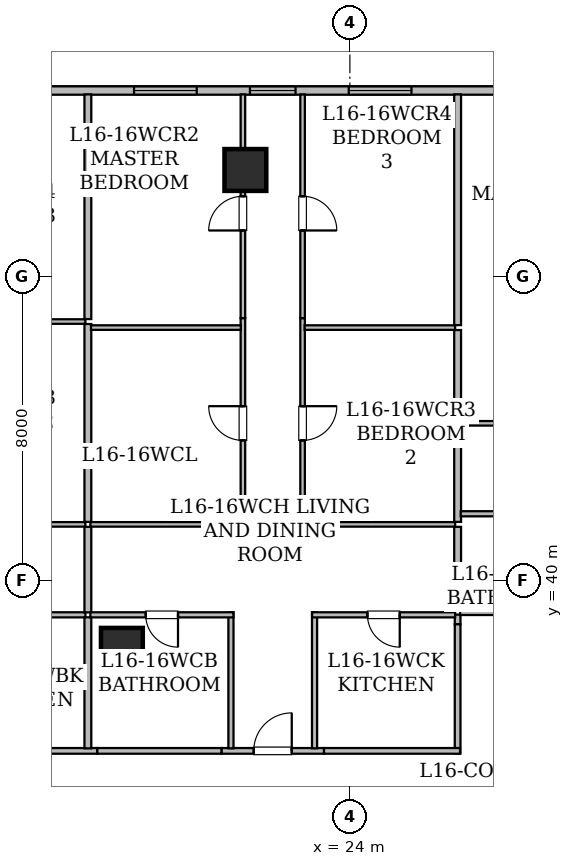
"""IFC4 building model, lengths in metres.
Left out: names, types, materials, properties, quantities, classifications, styles, units other than length and angle.
Written with IfcOpenShell. Run it as: python <this file> out.ifc"""

import sys

from ifc_helpers import new_model, si_unit, direction, frame, frame_2d, origin, origin_2d, place, context, subcontext, project, spatial, rectangle, hollow_rectangle, extrude, element, fill, save


model = new_model("IFC4")
c1 = context("Model", 3, precision=1e-05, world=origin(), true_north=direction((0.0, 1.0)))
c2 = subcontext(c1, "Body", "Model", "MODEL_VIEW")
j1 = project(units=[si_unit("LENGTHUNIT", "METRE"), si_unit("PLANEANGLEUNIT", "RADIAN")], contexts=[c1])
p1 = place(None, origin())
s1 = spatial("IfcSite", under=j1, at=p1, CompositionType="ELEMENT")
p2 = place(p1, origin())
s2 = spatial("IfcBuilding", under=s1, at=p2, CompositionType="ELEMENT")
p3 = place(p2, frame((0.0, 0.0, 66.15)))
s3 = spatial("IfcBuildingStorey", under=s2, at=p3, CompositionType="ELEMENT", Elevation=66.15)
for number, where, z_axis, x_axis in (
    (1, (21.25, 50.8, 0.0), (0.0, 0.0, 1.0), (1.0, 0.0, 0.0)),
    (2, (18.0, 38.2, 0.0), (0.0, 0.0, 1.0), (1.0, 0.0, 0.0)),
):
    element("IfcColumn", number, at=place(p3, frame(where, z_axis=z_axis, x_axis=x_axis)), inside=s3, PredefinedType="COLUMN", context=c2, shape_type="SweptSolid", body=[
        extrude(hollow_rectangle(XDim=1.1, YDim=1.1, WallThickness=0.055, at=origin_2d()), origin(), (0.0, 0.0, 1.0), 3.65),
    ])
p4 = place(p3, frame((8.315, 52.89, 0.0), z_axis=(0.0, 0.0, 1.0), x_axis=(1.0, 0.0, 0.0)))
e3 = element("IfcWall", 3, at=p4, inside=s3, PredefinedType="STANDARD", context=c2, shape_type="SweptSolid", body=[
    extrude(rectangle(XDim=37.439, YDim=0.22, at=frame_2d((18.719, 0.0))), origin(), (0.0, 0.0, 1.0), 3.43),
])
p5 = place(p4, frame((5.093, 0.0, 0.85)))
e4 = element("IfcOpeningElement", 4, at=p5, cuts=e3, PredefinedType="OPENING", context=c2, shape_type="SweptSolid", body=[
    extrude(rectangle(XDim=1.65, YDim=1.55, at=frame_2d((0.825, 0.775))), frame((0.0, 0.12, 0.0), z_axis=(0.0, -1.0, 0.0), x_axis=(1.0, 0.0, 0.0)), (0.0, 0.0, 1.0), 0.24),
])
p6 = place(p4, frame((13.055, 0.0, 0.8)))
e5 = element("IfcOpeningElement", 5, at=p6, cuts=e3, PredefinedType="OPENING", context=c2, shape_type="SweptSolid", body=[
    extrude(rectangle(XDim=1.2, YDim=1.5, at=frame_2d((0.6, 0.75))), frame((0.0, 0.12, 0.0), z_axis=(0.0, -1.0, 0.0), x_axis=(1.0, 0.0, 0.0)), (0.0, 0.0, 1.0), 0.24),
])
p7 = place(p4, frame((10.005, 0.0, 0.85)))
e6 = element("IfcOpeningElement", 6, at=p7, cuts=e3, PredefinedType="OPENING", context=c2, shape_type="SweptSolid", body=[
    extrude(rectangle(XDim=1.65, YDim=1.55, at=frame_2d((0.825, 0.775))), frame((0.0, 0.12, 0.0), z_axis=(0.0, -1.0, 0.0), x_axis=(1.0, 0.0, 0.0)), (0.0, 0.0, 1.0), 0.24),
])
p8 = place(p4, frame((15.655, 0.0, 0.85)))
e7 = element("IfcOpeningElement", 7, at=p8, cuts=e3, PredefinedType="OPENING", context=c2, shape_type="SweptSolid", body=[
    extrude(rectangle(XDim=1.65, YDim=1.55, at=frame_2d((0.825, 0.775))), frame((0.0, 0.12, 0.0), z_axis=(0.0, -1.0, 0.0), x_axis=(1.0, 0.0, 0.0)), (0.0, 0.0, 1.0), 0.24),
])
p9 = place(p4, frame((25.185, 0.0, 0.8)))
e8 = element("IfcOpeningElement", 8, at=p9, cuts=e3, PredefinedType="OPENING", context=c2, shape_type="SweptSolid", body=[
    extrude(rectangle(XDim=1.2, YDim=1.5, at=frame_2d((0.6, 0.75))), frame((0.0, 0.12, 0.0), z_axis=(0.0, -1.0, 0.0), x_axis=(1.0, 0.0, 0.0)), (0.0, 0.0, 1.0), 0.24),
])
p10 = place(p4, frame((20.935, 0.0, 0.85)))
e9 = element("IfcOpeningElement", 9, at=p10, cuts=e3, PredefinedType="OPENING", context=c2, shape_type="SweptSolid", body=[
    extrude(rectangle(XDim=1.65, YDim=1.55, at=frame_2d((0.825, 0.775))), frame((0.0, 0.12, 0.0), z_axis=(0.0, -1.0, 0.0), x_axis=(1.0, 0.0, 0.0)), (0.0, 0.0, 1.0), 0.24),
])
p11 = place(p4, frame((28.985, 0.0, 0.85)))
e10 = element("IfcOpeningElement", 10, at=p11, cuts=e3, PredefinedType="OPENING", context=c2, shape_type="SweptSolid", body=[
    extrude(rectangle(XDim=1.65, YDim=1.55, at=frame_2d((0.825, 0.775))), frame((0.0, 0.12, 0.0), z_axis=(0.0, -1.0, 0.0), x_axis=(1.0, 0.0, 0.0)), (0.0, 0.0, 1.0), 0.24),
])
p12 = place(p4, frame((33.49, 0.0, 0.85)))
e11 = element("IfcOpeningElement", 11, at=p12, cuts=e3, PredefinedType="OPENING", context=c2, shape_type="SweptSolid", body=[
    extrude(rectangle(XDim=1.65, YDim=1.55, at=frame_2d((0.825, 0.775))), frame((0.0, 0.12, 0.0), z_axis=(0.0, -1.0, 0.0), x_axis=(1.0, 0.0, 0.0)), (0.0, 0.0, 1.0), 0.24),
])
p13 = place(p4, frame((35.942, 0.0, 0.85)))
e12 = element("IfcOpeningElement", 12, at=p13, cuts=e3, PredefinedType="OPENING", context=c2, shape_type="SweptSolid", body=[
    extrude(rectangle(XDim=1.35, YDim=1.5, at=frame_2d((0.675, 0.75))), frame((0.0, 0.12, 0.0), z_axis=(0.0, -1.0, 0.0), x_axis=(1.0, 0.0, 0.0)), (0.0, 0.0, 1.0), 0.24),
])
p14 = place(p3, frame((11.924, 35.515, 0.0), z_axis=(0.0, 0.0, 1.0), x_axis=(1.0, 0.0, 0.0)))
e13 = element("IfcWall", 13, at=p14, inside=s3, PredefinedType="STANDARD", context=c2, shape_type="SweptSolid", body=[
    extrude(rectangle(XDim=5.43, YDim=0.15, at=frame_2d((2.715, 0.0))), origin(), (0.0, 0.0, 1.0), 3.43),
])
p15 = place(p3, frame((26.835, 38.846, 0.0), z_axis=(0.0, 0.0, 1.0), x_axis=(0.0, 1.0, 0.0)))
e14 = element("IfcWall", 14, at=p15, inside=s3, PredefinedType="STANDARD", context=c2, shape_type="SweptSolid", body=[
    extrude(rectangle(XDim=0.254, YDim=0.15, at=frame_2d((0.127, 0.0))), origin(), (0.0, 0.0, 1.0), 3.43),
])
p16 = place(p3, frame((20.621, 35.515, 0.0), z_axis=(0.0, 0.0, 1.0), x_axis=(1.0, 0.0, 0.0)))
e15 = element("IfcWall", 15, at=p16, inside=s3, PredefinedType="STANDARD", context=c2, shape_type="SweptSolid", body=[
    extrude(rectangle(XDim=2.698, YDim=0.15, at=frame_2d((1.349, 0.0))), origin(), (0.0, 0.0, 1.0), 3.43),
])
p17 = place(p16, frame((0.849, 0.0, 0.0)))
e16 = element("IfcOpeningElement", 16, at=p17, cuts=e15, PredefinedType="OPENING", context=c2, shape_type="SweptSolid", body=[
    extrude(rectangle(XDim=1.0, YDim=2.15, at=frame_2d((0.5, 1.075))), frame((0.0, 0.085, 0.0), z_axis=(0.0, -1.0, 0.0), x_axis=(1.0, 0.0, 0.0)), (0.0, 0.0, 1.0), 0.17),
])
p18 = place(p3, frame((17.354, 35.515, 0.0), z_axis=(0.0, 0.0, 1.0), x_axis=(1.0, 0.0, 0.0)))
e17 = element("IfcWall", 17, at=p18, inside=s3, PredefinedType="STANDARD", context=c2, shape_type="SweptSolid", body=[
    extrude(rectangle(XDim=3.267, YDim=0.15, at=frame_2d((1.634, 0.0))), origin(), (0.0, 0.0, 1.0), 2.647),
])
p19 = place(p3, frame((26.835, 35.45, 0.0), z_axis=(0.0, 0.0, 1.0), x_axis=(0.0, 1.0, 0.0)))
e18 = element("IfcWall", 18, at=p19, inside=s3, PredefinedType="STANDARD", context=c2, shape_type="SweptSolid", body=[
    extrude(rectangle(XDim=3.396, YDim=0.15, at=frame_2d((1.698, 0.0))), origin(), (0.0, 0.0, 1.0), 2.647),
])
p20 = place(p3, frame((23.319, 35.515, 0.0), z_axis=(0.0, 0.0, 1.0), x_axis=(1.0, 0.0, 0.0)))
e19 = element("IfcWall", 19, at=p20, inside=s3, PredefinedType="STANDARD", context=c2, shape_type="SweptSolid", body=[
    extrude(rectangle(XDim=3.579, YDim=0.15, at=frame_2d((1.79, 0.0))), origin(), (0.0, 0.0, 1.0), 3.43),
])
p21 = place(p3, frame((26.9, 39.165, 0.0), z_axis=(0.0, 0.0, 1.0), x_axis=(1.0, 0.0, 0.0)))
e20 = element("IfcWall", 20, at=p21, inside=s3, PredefinedType="STANDARD", context=c2, shape_type="SweptSolid", body=[
    extrude(rectangle(XDim=4.701, YDim=0.15, at=frame_2d((2.351, 0.0))), origin(), (0.0, 0.0, 1.0), 2.647),
])
p22 = place(p3, frame((17.04, 39.095, 0.0), z_axis=(0.0, 0.0, 1.0), x_axis=(-1.0, 0.0, 0.0)))
e21 = element("IfcWall", 21, at=p22, inside=s3, PredefinedType="PARTITIONING", context=c2, shape_type="SweptSolid", body=[
    extrude(rectangle(XDim=5.43, YDim=0.135, at=frame_2d((2.715, 0.0))), origin(), (0.0, 0.0, 1.0), 2.647),
])
p23 = place(p22, frame((2.29, 0.0, 0.0)))
e22 = element("IfcOpeningElement", 22, at=p23, cuts=e21, PredefinedType="OPENING", context=c2, shape_type="SweptSolid", body=[
    extrude(rectangle(XDim=0.85, YDim=2.1, at=frame_2d((0.425, 1.05))), frame((0.0, 0.077, 0.0), z_axis=(0.0, -1.0, 0.0), x_axis=(1.0, 0.0, 0.0)), (0.0, 0.0, 1.0), 0.155),
])
p24 = place(p3, frame((11.295, 41.475, 0.0), z_axis=(0.0, 0.0, 1.0), x_axis=(1.0, 0.0, 0.0)))
e23 = element("IfcWall", 23, at=p24, inside=s3, PredefinedType="PARTITIONING", context=c2, shape_type="SweptSolid", body=[
    extrude(rectangle(XDim=5.745, YDim=0.12, at=frame_2d((2.873, 0.0))), origin(), (0.0, 0.0, 1.0), 2.647),
])
p25 = place(p24, frame((2.422, 0.0, 0.0)))
e24 = element("IfcOpeningElement", 24, at=p25, cuts=e23, PredefinedType="OPENING", context=c2, shape_type="SweptSolid", body=[
    extrude(rectangle(XDim=0.9, YDim=2.1, at=frame_2d((0.45, 1.05))), frame((0.0, 0.07, 0.0), z_axis=(0.0, -1.0, 0.0), x_axis=(1.0, 0.0, 0.0)), (0.0, 0.0, 1.0), 0.14),
])
p26 = place(p3, frame((17.105, 41.41, 0.0), z_axis=(0.0, 0.0, 1.0), x_axis=(0.0, -1.0, 0.0)))
e25 = element("IfcWall", 25, at=p26, inside=s3, PredefinedType="STANDARD", context=c2, shape_type="SweptSolid", body=[
    extrude(rectangle(XDim=2.25, YDim=0.18, at=frame_2d((1.125, 0.0))), origin(), (0.0, 0.0, 1.0), 2.647),
])
p27 = place(p3, frame((17.105, 39.03, 0.0), z_axis=(0.0, 0.0, 1.0), x_axis=(0.0, -1.0, 0.0)))
e26 = element("IfcWall", 26, at=p27, inside=s3, PredefinedType="STANDARD", context=c2, shape_type="SweptSolid", body=[
    extrude(rectangle(XDim=3.448, YDim=0.18, at=frame_2d((1.724, 0.0))), origin(), (0.0, 0.0, 1.0), 2.647),
])
p28 = place(p3, frame((11.414, 46.812, 0.0), z_axis=(0.0, 0.0, 1.0), x_axis=(1.0, 0.0, 0.0)))
e27 = element("IfcWall", 27, at=p28, inside=s3, PredefinedType="PARTITIONING", context=c2, shape_type="SweptSolid", body=[
    extrude(rectangle(XDim=5.626, YDim=0.12, at=frame_2d((2.813, 0.0))), origin(), (0.0, 0.0, 1.0), 2.647),
])
p29 = place(p3, frame((17.105, 46.747, 0.0), z_axis=(0.0, 0.0, 1.0), x_axis=(0.0, -1.0, 0.0)))
e28 = element("IfcWall", 28, at=p29, inside=s3, PredefinedType="STANDARD", context=c2, shape_type="SweptSolid", body=[
    extrude(rectangle(XDim=5.207, YDim=0.18, at=frame_2d((2.604, 0.0))), origin(), (0.0, 0.0, 1.0), 3.065),
])
p30 = place(p3, frame((17.105, 52.788, 0.0), z_axis=(0.0, 0.0, 1.0), x_axis=(0.0, -1.0, 0.0)))
e29 = element("IfcWall", 29, at=p30, inside=s3, PredefinedType="STANDARD", context=c2, shape_type="SweptSolid", body=[
    extrude(rectangle(XDim=5.911, YDim=0.18, at=frame_2d((2.956, 0.0))), origin(), (0.0, 0.0, 1.0), 2.803),
])
p31 = place(p3, frame((20.87, 35.582, 0.0), z_axis=(0.0, 0.0, 1.0), x_axis=(0.0, 1.0, 0.0)))
e30 = element("IfcWall", 30, at=p31, inside=s3, PredefinedType="PARTITIONING", context=c2, shape_type="SweptSolid", body=[
    extrude(rectangle(XDim=3.578, YDim=0.135, at=frame_2d((1.789, 0.0))), origin(), (0.0, 0.0, 1.0), 2.647),
])
p32 = place(p3, frame((20.935, 39.095, 0.0), z_axis=(0.0, 0.0, 1.0), x_axis=(-1.0, 0.0, 0.0)))
e31 = element("IfcWall", 31, at=p32, inside=s3, PredefinedType="PARTITIONING", context=c2, shape_type="SweptSolid", body=[
    extrude(rectangle(XDim=3.765, YDim=0.135, at=frame_2d((1.883, 0.0))), origin(), (0.0, 0.0, 1.0), 2.647),
])
p33 = place(p32, frame((1.458, 0.0, 0.0)))
e32 = element("IfcOpeningElement", 32, at=p33, cuts=e31, PredefinedType="OPENING", context=c2, shape_type="SweptSolid", body=[
    extrude(rectangle(XDim=0.85, YDim=2.1, at=frame_2d((0.425, 1.05))), frame((0.0, 0.077, 0.0), z_axis=(0.0, -1.0, 0.0), x_axis=(1.0, 0.0, 0.0)), (0.0, 0.0, 1.0), 0.155),
])
p34 = place(p3, frame((23.07, 39.16, 0.0), z_axis=(0.0, 0.0, 1.0), x_axis=(0.0, -1.0, 0.0)))
e33 = element("IfcWall", 33, at=p34, inside=s3, PredefinedType="PARTITIONING", context=c2, shape_type="SweptSolid", body=[
    extrude(rectangle(XDim=3.578, YDim=0.135, at=frame_2d((1.789, 0.0))), origin(), (0.0, 0.0, 1.0), 2.647),
])
p35 = place(p3, frame((26.77, 39.095, 0.0), z_axis=(0.0, 0.0, 1.0), x_axis=(-1.0, 0.0, 0.0)))
e34 = element("IfcWall", 34, at=p35, inside=s3, PredefinedType="PARTITIONING", context=c2, shape_type="SweptSolid", body=[
    extrude(rectangle(XDim=3.765, YDim=0.135, at=frame_2d((1.883, 0.0))), origin(), (0.0, 0.0, 1.0), 3.43),
])
p36 = place(p35, frame((1.458, 0.0, 0.0)))
e35 = element("IfcOpeningElement", 35, at=p36, cuts=e34, PredefinedType="OPENING", context=c2, shape_type="SweptSolid", body=[
    extrude(rectangle(XDim=0.85, YDim=2.1, at=frame_2d((0.425, 1.05))), frame((0.0, 0.077, 0.0), z_axis=(0.0, -1.0, 0.0), x_axis=(1.0, 0.0, 0.0)), (0.0, 0.0, 1.0), 0.155),
])
p37 = place(p3, frame((17.17, 41.475, 0.0), z_axis=(0.0, 0.0, 1.0), x_axis=(1.0, 0.0, 0.0)))
e36 = element("IfcWall", 36, at=p37, inside=s3, PredefinedType="PARTITIONING", context=c2, shape_type="SweptSolid", body=[
    extrude(rectangle(XDim=4.08, YDim=0.12, at=frame_2d((2.04, 0.0))), origin(), (0.0, 0.0, 1.0), 2.647),
])
p38 = place(p3, frame((21.185, 41.41, 0.0), z_axis=(0.0, 0.0, 1.0), x_axis=(0.0, 1.0, 0.0)))
e37 = element("IfcWall", 37, at=p38, inside=s3, PredefinedType="PARTITIONING", context=c2, shape_type="SweptSolid", body=[
    extrude(rectangle(XDim=5.492, YDim=0.12, at=frame_2d((2.746, 0.0))), origin(), (0.0, 0.0, 1.0), 3.065),
])
p39 = place(p38, frame((2.275, 0.0, 0.0)))
e38 = element("IfcOpeningElement", 38, at=p39, cuts=e37, PredefinedType="OPENING", context=c2, shape_type="SweptSolid", body=[
    extrude(rectangle(XDim=0.9, YDim=2.1, at=frame_2d((0.45, 1.05))), frame((0.0, 0.07, 0.0), z_axis=(0.0, -1.0, 0.0), x_axis=(1.0, 0.0, 0.0)), (0.0, 0.0, 1.0), 0.14),
])
p40 = place(p3, frame((21.185, 46.902, 0.0), z_axis=(0.0, 0.0, 1.0), x_axis=(0.0, 1.0, 0.0)))
e39 = element("IfcWall", 39, at=p40, inside=s3, PredefinedType="PARTITIONING", context=c2, shape_type="SweptSolid", body=[
    extrude(rectangle(XDim=5.886, YDim=0.12, at=frame_2d((2.943, 0.0))), origin(), (0.0, 0.0, 1.0), 2.647),
])
p41 = place(p40, frame((2.306, 0.0, 0.0)))
e40 = element("IfcOpeningElement", 40, at=p41, cuts=e39, PredefinedType="OPENING", context=c2, shape_type="SweptSolid", body=[
    extrude(rectangle(XDim=0.9, YDim=2.1, at=frame_2d((0.45, 1.05))), frame((0.0, 0.07, 0.0), z_axis=(0.0, -1.0, 0.0), x_axis=(1.0, 0.0, 0.0)), (0.0, 0.0, 1.0), 0.14),
])
p42 = place(p3, frame((22.755, 46.902, 0.0), z_axis=(0.0, 0.0, 1.0), x_axis=(0.0, -1.0, 0.0)))
e41 = element("IfcWall", 41, at=p42, inside=s3, PredefinedType="PARTITIONING", context=c2, shape_type="SweptSolid", body=[
    extrude(rectangle(XDim=5.492, YDim=0.12, at=frame_2d((2.746, 0.0))), origin(), (0.0, 0.0, 1.0), 3.065),
])
p43 = place(p42, frame((2.317, 0.0, 0.0)))
e42 = element("IfcOpeningElement", 42, at=p43, cuts=e41, PredefinedType="OPENING", context=c2, shape_type="SweptSolid", body=[
    extrude(rectangle(XDim=0.9, YDim=2.1, at=frame_2d((0.45, 1.05))), frame((0.0, 0.07, 0.0), z_axis=(0.0, -1.0, 0.0), x_axis=(1.0, 0.0, 0.0)), (0.0, 0.0, 1.0), 0.14),
])
p44 = place(p3, frame((22.69, 41.475, 0.0), z_axis=(0.0, 0.0, 1.0), x_axis=(1.0, 0.0, 0.0)))
e43 = element("IfcWall", 43, at=p44, inside=s3, PredefinedType="PARTITIONING", context=c2, shape_type="SweptSolid", body=[
    extrude(rectangle(XDim=4.08, YDim=0.12, at=frame_2d((2.04, 0.0))), origin(), (0.0, 0.0, 1.0), 3.43),
])
p45 = place(p3, frame((22.755, 52.788, 0.0), z_axis=(0.0, 0.0, 1.0), x_axis=(0.0, -1.0, 0.0)))
e44 = element("IfcWall", 44, at=p45, inside=s3, PredefinedType="PARTITIONING", context=c2, shape_type="SweptSolid", body=[
    extrude(rectangle(XDim=5.886, YDim=0.12, at=frame_2d((2.943, 0.0))), origin(), (0.0, 0.0, 1.0), 2.803),
])
p46 = place(p45, frame((2.68, 0.0, 0.0)))
e45 = element("IfcOpeningElement", 45, at=p46, cuts=e44, PredefinedType="OPENING", context=c2, shape_type="SweptSolid", body=[
    extrude(rectangle(XDim=0.9, YDim=2.1, at=frame_2d((0.45, 1.05))), frame((0.0, 0.07, 0.0), z_axis=(0.0, -1.0, 0.0), x_axis=(1.0, 0.0, 0.0)), (0.0, 0.0, 1.0), 0.14),
])
p47 = place(p3, frame((26.835, 41.41, 0.0), z_axis=(0.0, 0.0, 1.0), x_axis=(0.0, -1.0, 0.0)))
e46 = element("IfcWall", 46, at=p47, inside=s3, PredefinedType="STANDARD", context=c2, shape_type="SweptSolid", body=[
    extrude(rectangle(XDim=2.18, YDim=0.18, at=frame_2d((1.09, 0.0))), origin(), (0.0, 0.0, 1.0), 3.43),
])
p48 = place(p3, frame((17.187, 46.653, 0.0), z_axis=(0.0, 0.0, 1.0), x_axis=(1.0, 0.0, 0.0)))
e47 = element("IfcWall", 47, at=p48, inside=s3, PredefinedType="PARTITIONING", context=c2, shape_type="SweptSolid", body=[
    extrude(rectangle(XDim=3.944, YDim=0.12, at=frame_2d((1.972, 0.0))), origin(), (0.0, 0.0, 1.0), 2.647),
])
p49 = place(p3, frame((22.809, 46.653, 0.0), z_axis=(0.0, 0.0, 1.0), x_axis=(1.0, 0.0, 0.0)))
e48 = element("IfcWall", 48, at=p49, inside=s3, PredefinedType="PARTITIONING", context=c2, shape_type="SweptSolid", body=[
    extrude(rectangle(XDim=3.961, YDim=0.12, at=frame_2d((1.98, 0.0))), origin(), (0.0, 0.0, 1.0), 3.43),
])
p50 = place(p3, frame((26.835, 44.383, 0.0), z_axis=(0.0, 0.0, 1.0), x_axis=(0.0, -1.0, 0.0)))
e49 = element("IfcWall", 49, at=p50, inside=s3, PredefinedType="STANDARD", context=c2, shape_type="SweptSolid", body=[
    extrude(rectangle(XDim=2.843, YDim=0.18, at=frame_2d((1.421, 0.0))), origin(), (0.0, 0.0, 1.0), 3.065),
])
p51 = place(p3, frame((26.835, 46.588, 0.0), z_axis=(0.0, 0.0, 1.0), x_axis=(0.0, -1.0, 0.0)))
e50 = element("IfcWall", 50, at=p51, inside=s3, PredefinedType="STANDARD", context=c2, shape_type="SweptSolid", body=[
    extrude(rectangle(XDim=2.205, YDim=0.18, at=frame_2d((1.103, 0.0))), origin(), (0.0, 0.0, 1.0), 3.43),
])
p52 = place(p3, frame((26.835, 52.788, 0.0), z_axis=(0.0, 0.0, 1.0), x_axis=(0.0, -1.0, 0.0)))
e51 = element("IfcWall", 51, at=p52, inside=s3, PredefinedType="STANDARD", context=c2, shape_type="SweptSolid", body=[
    extrude(rectangle(XDim=6.07, YDim=0.18, at=frame_2d((3.035, 0.0))), origin(), (0.0, 0.0, 1.0), 2.803),
])
p53 = place(p3, frame((31.915, 41.754, 0.0), z_axis=(0.0, 0.0, 1.0), x_axis=(-1.0, 0.0, 0.0)))
e52 = element("IfcWall", 52, at=p53, inside=s3, PredefinedType="PARTITIONING", context=c2, shape_type="SweptSolid", body=[
    extrude(rectangle(XDim=4.998, YDim=0.135, at=frame_2d((2.499, 0.0))), origin(), (0.0, 0.0, 1.0), 2.647),
])
p54 = place(p53, frame((2.074, 0.0, 0.0)))
e53 = element("IfcOpeningElement", 53, at=p54, cuts=e52, PredefinedType="OPENING", context=c2, shape_type="SweptSolid", body=[
    extrude(rectangle(XDim=0.85, YDim=2.1, at=frame_2d((0.425, 1.05))), frame((0.0, 0.077, 0.0), z_axis=(0.0, -1.0, 0.0), x_axis=(1.0, 0.0, 0.0)), (0.0, 0.0, 1.0), 0.155),
])
p55 = place(p3, frame((26.917, 44.134, 0.0), z_axis=(0.0, 0.0, 1.0), x_axis=(1.0, 0.0, 0.0)))
e54 = element("IfcWall", 54, at=p55, inside=s3, PredefinedType="PARTITIONING", context=c2, shape_type="SweptSolid", body=[
    extrude(rectangle(XDim=6.463, YDim=0.12, at=frame_2d((3.231, 0.0))), origin(), (0.0, 0.0, 1.0), 2.647),
])
p56 = place(p6, origin())
e55 = element("IfcWindow", 55, at=p56, inside=s3, PartitioningType="SINGLE_PANEL", PredefinedType="WINDOW", context=c2, shape_type="SweptSolid", body=[
    extrude(rectangle(XDim=1.2, YDim=1.5, at=frame_2d((0.6, 0.75))), frame((0.0, 0.03, 0.0), z_axis=(0.0, -1.0, 0.0), x_axis=(1.0, 0.0, 0.0)), (0.0, 0.0, 1.0), 0.06),
])
fill(e5, e55)
p57 = place(p7, origin())
e56 = element("IfcWindow", 56, at=p57, inside=s3, PartitioningType="SINGLE_PANEL", PredefinedType="WINDOW", context=c2, shape_type="SweptSolid", body=[
    extrude(rectangle(XDim=1.65, YDim=1.55, at=frame_2d((0.825, 0.775))), frame((0.0, 0.03, 0.0), z_axis=(0.0, -1.0, 0.0), x_axis=(1.0, 0.0, 0.0)), (0.0, 0.0, 1.0), 0.06),
])
fill(e6, e56)
p58 = place(p8, origin())
e57 = element("IfcWindow", 57, at=p58, inside=s3, PartitioningType="SINGLE_PANEL", PredefinedType="WINDOW", context=c2, shape_type="SweptSolid", body=[
    extrude(rectangle(XDim=1.65, YDim=1.55, at=frame_2d((0.825, 0.775))), frame((0.0, 0.03, 0.0), z_axis=(0.0, -1.0, 0.0), x_axis=(1.0, 0.0, 0.0)), (0.0, 0.0, 1.0), 0.06),
])
fill(e7, e57)
p59 = place(p17, origin())
e58 = element("IfcDoor", 58, at=p59, inside=s3, OperationType="SINGLE_SWING_RIGHT", PredefinedType="DOOR", context=c2, shape_type="SweptSolid", body=[
    extrude(rectangle(XDim=1.0, YDim=2.15, at=frame_2d((0.5, 1.075))), frame((0.0, 0.025, 0.0), z_axis=(0.0, -1.0, 0.0), x_axis=(1.0, 0.0, 0.0)), (0.0, 0.0, 1.0), 0.05),
])
fill(e16, e58)
p60 = place(p33, origin())
e59 = element("IfcDoor", 59, at=p60, inside=s3, OperationType="SINGLE_SWING_LEFT", PredefinedType="DOOR", context=c2, shape_type="SweptSolid", body=[
    extrude(rectangle(XDim=0.85, YDim=2.1, at=frame_2d((0.425, 1.05))), frame((0.0, 0.025, 0.0), z_axis=(0.0, -1.0, 0.0), x_axis=(1.0, 0.0, 0.0)), (0.0, 0.0, 1.0), 0.05),
])
fill(e32, e59)
p61 = place(p36, origin())
e60 = element("IfcDoor", 60, at=p61, inside=s3, OperationType="SINGLE_SWING_LEFT", PredefinedType="DOOR", context=c2, shape_type="SweptSolid", body=[
    extrude(rectangle(XDim=0.85, YDim=2.1, at=frame_2d((0.425, 1.05))), frame((0.0, 0.025, 0.0), z_axis=(0.0, -1.0, 0.0), x_axis=(1.0, 0.0, 0.0)), (0.0, 0.0, 1.0), 0.05),
])
fill(e35, e60)
p62 = place(p39, origin())
e61 = element("IfcDoor", 61, at=p62, inside=s3, OperationType="SINGLE_SWING_RIGHT", PredefinedType="DOOR", context=c2, shape_type="SweptSolid", body=[
    extrude(rectangle(XDim=0.9, YDim=2.1, at=frame_2d((0.45, 1.05))), frame((0.0, 0.025, 0.0), z_axis=(0.0, -1.0, 0.0), x_axis=(1.0, 0.0, 0.0)), (0.0, 0.0, 1.0), 0.05),
])
fill(e38, e61)
p63 = place(p41, origin())
e62 = element("IfcDoor", 62, at=p63, inside=s3, OperationType="SINGLE_SWING_LEFT", PredefinedType="DOOR", context=c2, shape_type="SweptSolid", body=[
    extrude(rectangle(XDim=0.9, YDim=2.1, at=frame_2d((0.45, 1.05))), frame((0.0, 0.025, 0.0), z_axis=(0.0, -1.0, 0.0), x_axis=(1.0, 0.0, 0.0)), (0.0, 0.0, 1.0), 0.05),
])
fill(e40, e62)
p64 = place(p43, origin())
e63 = element("IfcDoor", 63, at=p64, inside=s3, OperationType="SINGLE_SWING_LEFT", PredefinedType="DOOR", context=c2, shape_type="SweptSolid", body=[
    extrude(rectangle(XDim=0.9, YDim=2.1, at=frame_2d((0.45, 1.05))), frame((0.0, 0.025, 0.0), z_axis=(0.0, -1.0, 0.0), x_axis=(1.0, 0.0, 0.0)), (0.0, 0.0, 1.0), 0.05),
])
fill(e42, e63)
p65 = place(p46, origin())
e64 = element("IfcDoor", 64, at=p65, inside=s3, OperationType="SINGLE_SWING_RIGHT", PredefinedType="DOOR", context=c2, shape_type="SweptSolid", body=[
    extrude(rectangle(XDim=0.9, YDim=2.1, at=frame_2d((0.45, 1.05))), frame((0.0, 0.025, 0.0), z_axis=(0.0, -1.0, 0.0), x_axis=(1.0, 0.0, 0.0)), (0.0, 0.0, 1.0), 0.05),
])
fill(e45, e64)
save(model, sys.argv[1])
